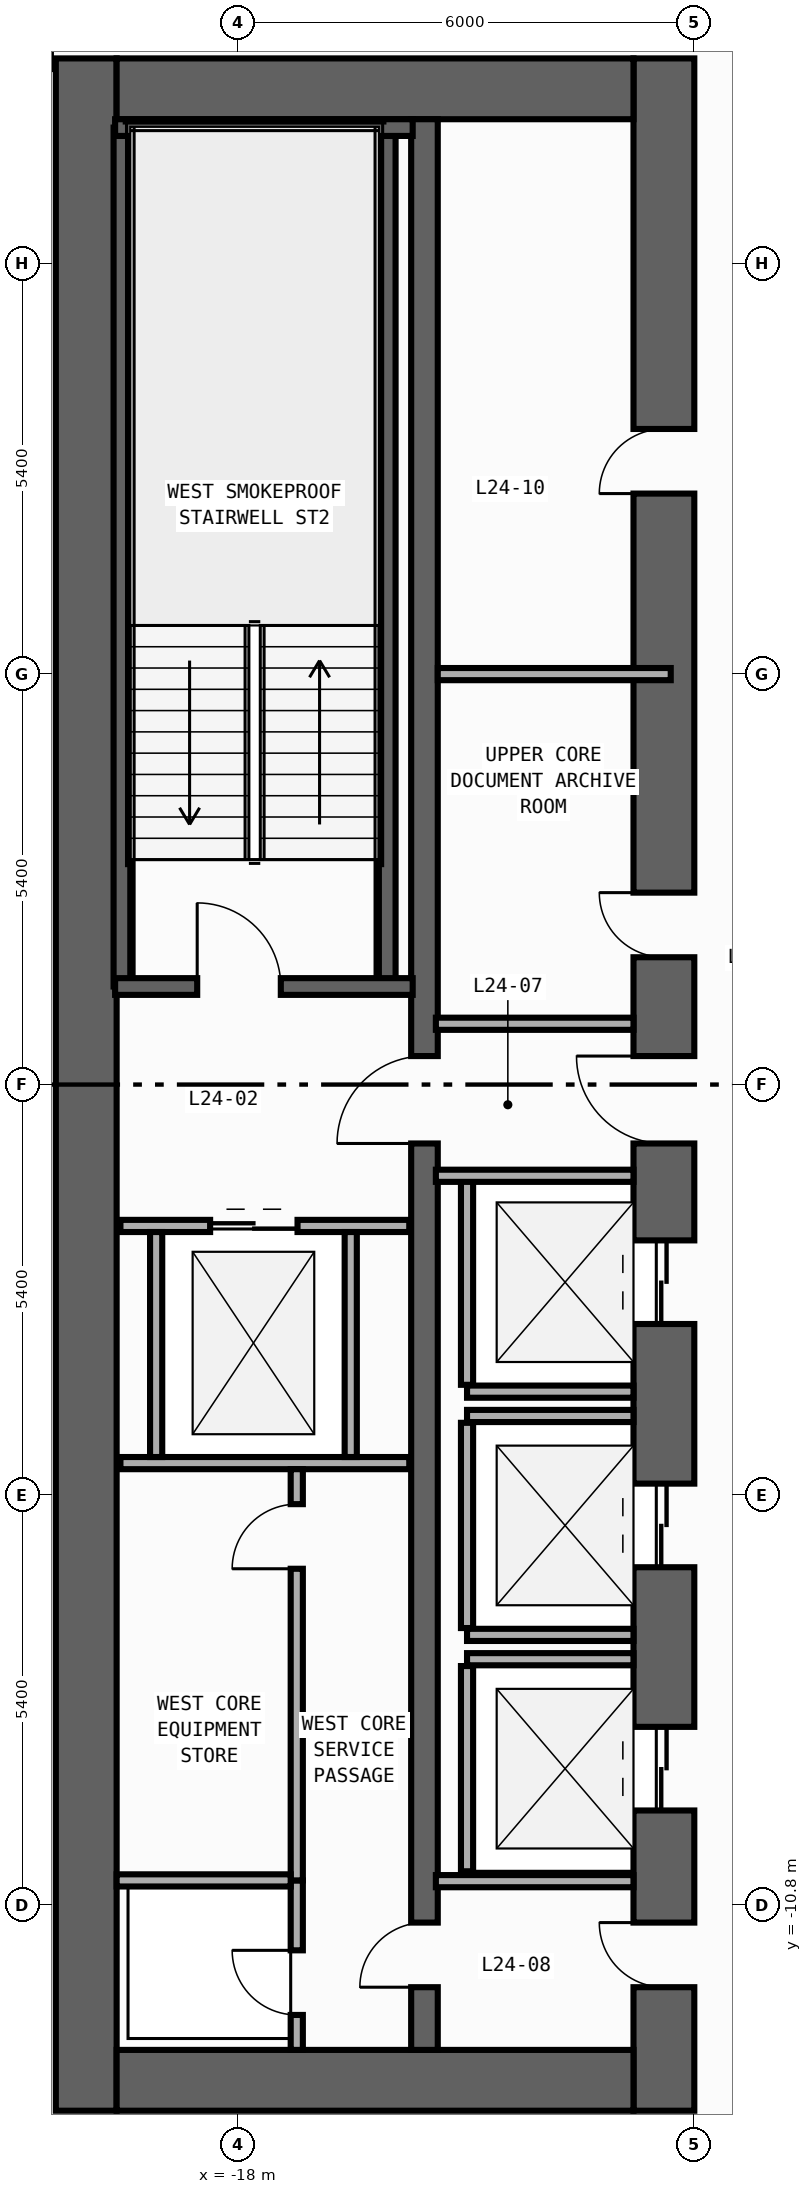
"""IFC4 building model, lengths in metres.
Left out: names, types, materials, properties, quantities, classifications, styles, units other than length and angle.
Written with IfcOpenShell. Run it as: python <this file> out.ifc"""

import sys

from ifc_helpers import new_model, si_unit, direction, frame, frame_2d, origin, place, context, subcontext, project, spatial, rectangle, extrude, element, fill, save


model = new_model("IFC4")
c1 = context("Model", 3, precision=1e-05, world=origin(), true_north=direction((0.0, 1.0)))
c2 = subcontext(c1, "Body", "Model", "MODEL_VIEW")
j1 = project(units=[si_unit("LENGTHUNIT", "METRE"), si_unit("PLANEANGLEUNIT", "RADIAN")], contexts=[c1])
p1 = place(None, origin())
s1 = spatial("IfcSite", under=j1, at=p1, CompositionType="ELEMENT")
p2 = place(p1, origin())
s2 = spatial("IfcBuilding", under=s1, at=p2, CompositionType="ELEMENT")
p3 = place(p2, frame((0.0, 0.0, 105.8)))
s3 = spatial("IfcBuildingStorey", under=s2, at=p3, CompositionType="ELEMENT", Elevation=105.8)
p4 = place(p3, frame((-20.0, -13.5, 0.0), z_axis=(0.0, 0.0, 1.0), x_axis=(0.0, 1.0, 0.0)))
e1 = element("IfcWall", 1, at=p4, inside=s3, PredefinedType="SHEAR", context=c2, shape_type="SweptSolid", body=[
    extrude(rectangle(XDim=27.0, YDim=0.8, at=frame_2d((13.5, 0.0))), origin(), (0.0, 0.0, 1.0), 3.94),
])
p5 = place(p3, frame((-12.4, -13.5, 0.0), z_axis=(0.0, 0.0, 1.0), x_axis=(0.0, 1.0, 0.0)))
e2 = element("IfcWall", 2, at=p5, inside=s3, PredefinedType="SHEAR", context=c2, shape_type="SweptSolid", body=[
    extrude(rectangle(XDim=27.0, YDim=0.8, at=frame_2d((13.5, 0.0))), origin(), (0.0, 0.0, 1.0), 3.94),
])
p6 = place(p5, frame((10.35, 0.0, 0.0)))
e3 = element("IfcOpeningElement", 3, at=p6, cuts=e2, PredefinedType="OPENING", context=c2, shape_type="SweptSolid", body=[
    extrude(rectangle(XDim=1.1, YDim=2.2, at=frame_2d((0.55, 1.1))), frame((0.0, 0.41, 0.0), z_axis=(0.0, -1.0, 0.0), x_axis=(1.0, 0.0, 0.0)), (0.0, 0.0, 1.0), 0.82),
])
p7 = place(p5, frame((7.15, 0.0, 0.0)))
e4 = element("IfcOpeningElement", 4, at=p7, cuts=e2, PredefinedType="OPENING", context=c2, shape_type="SweptSolid", body=[
    extrude(rectangle(XDim=1.1, YDim=2.2, at=frame_2d((0.55, 1.1))), frame((0.0, 0.41, 0.0), z_axis=(0.0, -1.0, 0.0), x_axis=(1.0, 0.0, 0.0)), (0.0, 0.0, 1.0), 0.82),
])
p8 = place(p5, frame((3.95, 0.0, 0.0)))
e5 = element("IfcOpeningElement", 5, at=p8, cuts=e2, PredefinedType="OPENING", context=c2, shape_type="SweptSolid", body=[
    extrude(rectangle(XDim=1.1, YDim=2.2, at=frame_2d((0.55, 1.1))), frame((0.0, 0.41, 0.0), z_axis=(0.0, -1.0, 0.0), x_axis=(1.0, 0.0, 0.0)), (0.0, 0.0, 1.0), 0.82),
])
p9 = place(p5, frame((15.175, 0.0, 0.0)))
e6 = element("IfcOpeningElement", 6, at=p9, cuts=e2, PredefinedType="OPENING", context=c2, shape_type="SweptSolid", body=[
    extrude(rectangle(XDim=0.85, YDim=2.1, at=frame_2d((0.425, 1.05))), frame((0.0, 0.41, 0.0), z_axis=(0.0, -1.0, 0.0), x_axis=(1.0, 0.0, 0.0)), (0.0, 0.0, 1.0), 0.82),
])
p10 = place(p5, frame((21.275, 0.0, 0.0)))
e7 = element("IfcOpeningElement", 7, at=p10, cuts=e2, PredefinedType="OPENING", context=c2, shape_type="SweptSolid", body=[
    extrude(rectangle(XDim=0.85, YDim=2.1, at=frame_2d((0.425, 1.05))), frame((0.0, 0.41, 0.0), z_axis=(0.0, -1.0, 0.0), x_axis=(1.0, 0.0, 0.0)), (0.0, 0.0, 1.0), 0.82),
])
p11 = place(p5, frame((12.725, 0.0, 0.0)))
e8 = element("IfcOpeningElement", 8, at=p11, cuts=e2, PredefinedType="OPENING", context=c2, shape_type="SweptSolid", body=[
    extrude(rectangle(XDim=1.15, YDim=2.2, at=frame_2d((0.575, 1.1))), frame((0.0, 0.41, 0.0), z_axis=(0.0, -1.0, 0.0), x_axis=(1.0, 0.0, 0.0)), (0.0, 0.0, 1.0), 0.82),
])
p12 = place(p5, frame((1.625, 0.0, 0.0)))
e9 = element("IfcOpeningElement", 9, at=p12, cuts=e2, PredefinedType="OPENING", context=c2, shape_type="SweptSolid", body=[
    extrude(rectangle(XDim=0.85, YDim=2.1, at=frame_2d((0.425, 1.05))), frame((0.0, 0.41, 0.0), z_axis=(0.0, -1.0, 0.0), x_axis=(1.0, 0.0, 0.0)), (0.0, 0.0, 1.0), 0.82),
])
for number, where, z_axis, x_axis in (
    (10, (-19.6, -13.1, 0.0), (0.0, 0.0, 1.0), (1.0, 0.0, 0.0)),
    (11, (-19.6, 13.1, 0.0), (0.0, 0.0, 1.0), (1.0, 0.0, 0.0)),
):
    element("IfcWall", number, at=place(p3, frame(where, z_axis=z_axis, x_axis=x_axis)), inside=s3, PredefinedType="SHEAR", context=c2, shape_type="SweptSolid", body=[
        extrude(rectangle(XDim=6.8, YDim=0.8, at=frame_2d((3.4, 0.0))), origin(), (0.0, 0.0, 1.0), 3.94),
    ])
p13 = place(p3, frame((-15.55, -12.7, 0.0), z_axis=(0.0, 0.0, 1.0), x_axis=(0.0, 1.0, 0.0)))
e12 = element("IfcWall", 12, at=p13, inside=s3, PredefinedType="SHEAR", context=c2, shape_type="SweptSolid", body=[
    extrude(rectangle(XDim=25.4, YDim=0.35, at=frame_2d((12.7, 0.0))), origin(), (0.0, 0.0, 1.0), 3.94),
])
p14 = place(p13, frame((11.925, 0.0, 0.0)))
e13 = element("IfcOpeningElement", 13, at=p14, cuts=e12, PredefinedType="OPENING", context=c2, shape_type="SweptSolid", body=[
    extrude(rectangle(XDim=1.15, YDim=2.2, at=frame_2d((0.575, 1.1))), frame((0.0, 0.185, 0.0), z_axis=(0.0, -1.0, 0.0), x_axis=(1.0, 0.0, 0.0)), (0.0, 0.0, 1.0), 0.37),
])
p15 = place(p13, frame((0.825, 0.0, 0.0)))
e14 = element("IfcOpeningElement", 14, at=p15, cuts=e12, PredefinedType="OPENING", context=c2, shape_type="SweptSolid", body=[
    extrude(rectangle(XDim=0.85, YDim=2.1, at=frame_2d((0.425, 1.05))), frame((0.0, 0.185, 0.0), z_axis=(0.0, -1.0, 0.0), x_axis=(1.0, 0.0, 0.0)), (0.0, 0.0, 1.0), 0.37),
])
for number, where, z_axis, x_axis in (
    (15, (-16.04, 1.29, 0.0), (0.0, 0.0, 1.0), (0.0, 1.0, 0.0)),
    (16, (-19.53, 1.29, 0.0), (0.0, 0.0, 1.0), (0.0, 1.0, 0.0)),
):
    element("IfcWall", number, at=place(p3, frame(where, z_axis=z_axis, x_axis=x_axis)), inside=s3, PredefinedType="SHEAR", context=c2, shape_type="SweptSolid", body=[
        extrude(rectangle(XDim=11.3, YDim=0.22, at=frame_2d((5.65, 0.0))), origin(), (0.0, 0.0, 1.0), 3.94),
    ])
p16 = place(p3, frame((-19.62, 12.59, 0.0), z_axis=(0.0, 0.0, 1.0), x_axis=(1.0, 0.0, 0.0)))
e17 = element("IfcWall", 17, at=p16, inside=s3, PredefinedType="SHEAR", context=c2, shape_type="SweptSolid", body=[
    extrude(rectangle(XDim=3.915, YDim=0.22, at=frame_2d((1.958, 0.0))), origin(), (0.0, 0.0, 1.0), 3.94),
])
p17 = place(p3, frame((-19.62, 1.29, 0.0), z_axis=(0.0, 0.0, 1.0), x_axis=(1.0, 0.0, 0.0)))
e18 = element("IfcWall", 18, at=p17, inside=s3, PredefinedType="SHEAR", context=c2, shape_type="SweptSolid", body=[
    extrude(rectangle(XDim=3.915, YDim=0.22, at=frame_2d((1.958, 0.0))), origin(), (0.0, 0.0, 1.0), 3.94),
])
p18 = place(p17, frame((1.08, 0.0, 0.0)))
e19 = element("IfcOpeningElement", 19, at=p18, cuts=e18, PredefinedType="OPENING", context=c2, shape_type="SweptSolid", body=[
    extrude(rectangle(XDim=1.1, YDim=2.2, at=frame_2d((0.55, 1.1))), frame((0.0, 0.12, 0.0), z_axis=(0.0, -1.0, 0.0), x_axis=(1.0, 0.0, 0.0)), (0.0, 0.0, 1.0), 0.24),
])
p19 = place(p3, frame((-14.99, -4.04, 0.0), z_axis=(0.0, 0.0, 1.0), x_axis=(1.0, 0.0, 0.0)))
e20 = element("IfcWall", 20, at=p19, inside=s3, PredefinedType="STANDARD", context=c2, shape_type="SweptSolid", body=[
    extrude(rectangle(XDim=2.19, YDim=0.16, at=frame_2d((1.095, 0.0))), origin(), (0.0, 0.0, 1.0), 3.94),
])
p20 = place(p3, frame((-14.99, -3.95, 0.0), z_axis=(0.0, 0.0, 1.0), x_axis=(0.0, 1.0, 0.0)))
e21 = element("IfcWall", 21, at=p20, inside=s3, PredefinedType="STANDARD", context=c2, shape_type="SweptSolid", body=[
    extrude(rectangle(XDim=2.7, YDim=0.16, at=frame_2d((1.35, 0.0))), origin(), (0.0, 0.0, 1.0), 3.94),
])
for number, where, z_axis, x_axis in (
    (22, (-14.99, -7.24, 0.0), (0.0, 0.0, 1.0), (1.0, 0.0, 0.0)),
    (23, (-14.99, -4.36, 0.0), (0.0, 0.0, 1.0), (1.0, 0.0, 0.0)),
):
    element("IfcWall", number, at=place(p3, frame(where, z_axis=z_axis, x_axis=x_axis)), inside=s3, PredefinedType="STANDARD", context=c2, shape_type="SweptSolid", body=[
        extrude(rectangle(XDim=2.19, YDim=0.16, at=frame_2d((1.095, 0.0))), origin(), (0.0, 0.0, 1.0), 3.94),
    ])
p21 = place(p3, frame((-14.99, -7.15, 0.0), z_axis=(0.0, 0.0, 1.0), x_axis=(0.0, 1.0, 0.0)))
e24 = element("IfcWall", 24, at=p21, inside=s3, PredefinedType="STANDARD", context=c2, shape_type="SweptSolid", body=[
    extrude(rectangle(XDim=2.7, YDim=0.16, at=frame_2d((1.35, 0.0))), origin(), (0.0, 0.0, 1.0), 3.94),
])
p22 = place(p3, frame((-14.99, -7.56, 0.0), z_axis=(0.0, 0.0, 1.0), x_axis=(1.0, 0.0, 0.0)))
e25 = element("IfcWall", 25, at=p22, inside=s3, PredefinedType="STANDARD", context=c2, shape_type="SweptSolid", body=[
    extrude(rectangle(XDim=2.19, YDim=0.16, at=frame_2d((1.095, 0.0))), origin(), (0.0, 0.0, 1.0), 3.94),
])
p23 = place(p3, frame((-14.99, -10.35, 0.0), z_axis=(0.0, 0.0, 1.0), x_axis=(0.0, 1.0, 0.0)))
e26 = element("IfcWall", 26, at=p23, inside=s3, PredefinedType="STANDARD", context=c2, shape_type="SweptSolid", body=[
    extrude(rectangle(XDim=2.7, YDim=0.16, at=frame_2d((1.35, 0.0))), origin(), (0.0, 0.0, 1.0), 3.94),
])
p24 = place(p3, frame((-19.55, -1.86, 0.0), z_axis=(0.0, 0.0, 1.0), x_axis=(1.0, 0.0, 0.0)))
e27 = element("IfcWall", 27, at=p24, inside=s3, PredefinedType="STANDARD", context=c2, shape_type="SweptSolid", body=[
    extrude(rectangle(XDim=3.8, YDim=0.16, at=frame_2d((1.9, 0.0))), origin(), (0.0, 0.0, 1.0), 3.94),
])
p25 = place(p24, frame((1.18, 0.0, 0.0)))
e28 = element("IfcOpeningElement", 28, at=p25, cuts=e27, PredefinedType="OPENING", context=c2, shape_type="SweptSolid", body=[
    extrude(rectangle(XDim=1.15, YDim=2.2, at=frame_2d((0.575, 1.1))), frame((0.0, 0.09, 0.0), z_axis=(0.0, -1.0, 0.0), x_axis=(1.0, 0.0, 0.0)), (0.0, 0.0, 1.0), 0.18),
])
p26 = place(p3, frame((-19.55, -4.98, 0.0), z_axis=(0.0, 0.0, 1.0), x_axis=(1.0, 0.0, 0.0)))
e29 = element("IfcWall", 29, at=p26, inside=s3, PredefinedType="STANDARD", context=c2, shape_type="SweptSolid", body=[
    extrude(rectangle(XDim=3.8, YDim=0.16, at=frame_2d((1.9, 0.0))), origin(), (0.0, 0.0, 1.0), 3.94),
])
for number, where, z_axis, x_axis in (
    (30, (-19.08, -4.9, 0.0), (0.0, 0.0, 1.0), (0.0, 1.0, 0.0)),
    (31, (-16.52, -4.9, 0.0), (0.0, 0.0, 1.0), (0.0, 1.0, 0.0)),
):
    element("IfcWall", number, at=place(p3, frame(where, z_axis=z_axis, x_axis=x_axis)), inside=s3, PredefinedType="STANDARD", context=c2, shape_type="SweptSolid", body=[
        extrude(rectangle(XDim=2.96, YDim=0.16, at=frame_2d((1.48, 0.0))), origin(), (0.0, 0.0, 1.0), 3.94),
    ])
for number, where, z_axis, x_axis in (
    (32, (-15.4, 0.8, 0.0), (0.0, 0.0, 1.0), (1.0, 0.0, 0.0)),
    (33, (-15.4, -1.2, 0.0), (0.0, 0.0, 1.0), (1.0, 0.0, 0.0)),
    (34, (-15.4, -10.48, 0.0), (0.0, 0.0, 1.0), (1.0, 0.0, 0.0)),
):
    element("IfcWall", number, at=place(p3, frame(where, z_axis=z_axis, x_axis=x_axis)), inside=s3, PredefinedType="STANDARD", context=c2, shape_type="SweptSolid", body=[
        extrude(rectangle(XDim=2.6, YDim=0.16, at=frame_2d((1.3, 0.0))), origin(), (0.0, 0.0, 1.0), 3.94),
    ])
p27 = place(p3, frame((-17.23, -12.7, 0.0), z_axis=(0.0, 0.0, 1.0), x_axis=(0.0, 1.0, 0.0)))
e35 = element("IfcWall", 35, at=p27, inside=s3, PredefinedType="PARTITIONING", context=c2, shape_type="SweptSolid", body=[
    extrude(rectangle(XDim=2.23, YDim=0.16, at=frame_2d((1.115, 0.0))), origin(), (0.0, 0.0, 1.0), 3.94),
])
p28 = place(p27, frame((0.46, 0.0, 0.0)))
e36 = element("IfcOpeningElement", 36, at=p28, cuts=e35, PredefinedType="OPENING", context=c2, shape_type="SweptSolid", body=[
    extrude(rectangle(XDim=0.85, YDim=2.1, at=frame_2d((0.425, 1.05))), frame((0.0, 0.09, 0.0), z_axis=(0.0, -1.0, 0.0), x_axis=(1.0, 0.0, 0.0)), (0.0, 0.0, 1.0), 0.18),
])
p29 = place(p3, frame((-17.23, -10.47, 0.0), z_axis=(0.0, 0.0, 1.0), x_axis=(0.0, 1.0, 0.0)))
e37 = element("IfcWall", 37, at=p29, inside=s3, PredefinedType="PARTITIONING", context=c2, shape_type="SweptSolid", body=[
    extrude(rectangle(XDim=5.41, YDim=0.16, at=frame_2d((2.705, 0.0))), origin(), (0.0, 0.0, 1.0), 3.94),
])
p30 = place(p29, frame((4.1, 0.0, 0.0)))
e38 = element("IfcOpeningElement", 38, at=p30, cuts=e37, PredefinedType="OPENING", context=c2, shape_type="SweptSolid", body=[
    extrude(rectangle(XDim=0.85, YDim=2.1, at=frame_2d((0.425, 1.05))), frame((0.0, 0.09, 0.0), z_axis=(0.0, -1.0, 0.0), x_axis=(1.0, 0.0, 0.0)), (0.0, 0.0, 1.0), 0.18),
])
p31 = place(p3, frame((-19.6, -10.47, 0.0), z_axis=(0.0, 0.0, 1.0), x_axis=(1.0, 0.0, 0.0)))
e39 = element("IfcWall", 39, at=p31, inside=s3, PredefinedType="PARTITIONING", context=c2, shape_type="SweptSolid", body=[
    extrude(rectangle(XDim=2.29, YDim=0.16, at=frame_2d((1.145, 0.0))), origin(), (0.0, 0.0, 1.0), 3.94),
])
p32 = place(p3, frame((-15.375, 5.4, 0.0), z_axis=(0.0, 0.0, 1.0), x_axis=(1.0, 0.0, 0.0)))
e40 = element("IfcWall", 40, at=p32, inside=s3, PredefinedType="PARTITIONING", context=c2, shape_type="SweptSolid", body=[
    extrude(rectangle(XDim=3.065, YDim=0.16, at=frame_2d((1.532, 0.0))), origin(), (0.0, 0.0, 1.0), 3.94),
])
p33 = place(p18, origin())
e41 = element("IfcDoor", 41, at=p33, inside=s3, OperationType="SINGLE_SWING_LEFT", PredefinedType="DOOR", context=c2, shape_type="SweptSolid", body=[
    extrude(rectangle(XDim=1.1, YDim=2.2, at=frame_2d((0.55, 1.1))), frame((0.0, 0.025, 0.0), z_axis=(0.0, -1.0, 0.0), x_axis=(1.0, 0.0, 0.0)), (0.0, 0.0, 1.0), 0.05),
])
fill(e19, e41)
p34 = place(p6, origin())
e42 = element("IfcDoor", 42, at=p34, inside=s3, OperationType="DOUBLE_DOOR_SLIDING", PredefinedType="DOOR", context=c2, shape_type="SweptSolid", body=[
    extrude(rectangle(XDim=1.1, YDim=2.2, at=frame_2d((0.55, 1.1))), frame((0.0, 0.025, 0.0), z_axis=(0.0, -1.0, 0.0), x_axis=(1.0, 0.0, 0.0)), (0.0, 0.0, 1.0), 0.05),
])
fill(e3, e42)
p35 = place(p7, origin())
e43 = element("IfcDoor", 43, at=p35, inside=s3, OperationType="DOUBLE_DOOR_SLIDING", PredefinedType="DOOR", context=c2, shape_type="SweptSolid", body=[
    extrude(rectangle(XDim=1.1, YDim=2.2, at=frame_2d((0.55, 1.1))), frame((0.0, 0.025, 0.0), z_axis=(0.0, -1.0, 0.0), x_axis=(1.0, 0.0, 0.0)), (0.0, 0.0, 1.0), 0.05),
])
fill(e4, e43)
p36 = place(p8, origin())
e44 = element("IfcDoor", 44, at=p36, inside=s3, OperationType="DOUBLE_DOOR_SLIDING", PredefinedType="DOOR", context=c2, shape_type="SweptSolid", body=[
    extrude(rectangle(XDim=1.1, YDim=2.2, at=frame_2d((0.55, 1.1))), frame((0.0, 0.025, 0.0), z_axis=(0.0, -1.0, 0.0), x_axis=(1.0, 0.0, 0.0)), (0.0, 0.0, 1.0), 0.05),
])
fill(e5, e44)
p37 = place(p9, origin())
e45 = element("IfcDoor", 45, at=p37, inside=s3, OperationType="SINGLE_SWING_RIGHT", PredefinedType="DOOR", context=c2, shape_type="SweptSolid", body=[
    extrude(rectangle(XDim=0.85, YDim=2.1, at=frame_2d((0.425, 1.05))), frame((0.0, 0.025, 0.0), z_axis=(0.0, -1.0, 0.0), x_axis=(1.0, 0.0, 0.0)), (0.0, 0.0, 1.0), 0.05),
])
fill(e6, e45)
p38 = place(p10, origin())
e46 = element("IfcDoor", 46, at=p38, inside=s3, OperationType="SINGLE_SWING_LEFT", PredefinedType="DOOR", context=c2, shape_type="SweptSolid", body=[
    extrude(rectangle(XDim=0.85, YDim=2.1, at=frame_2d((0.425, 1.05))), frame((0.0, 0.025, 0.0), z_axis=(0.0, -1.0, 0.0), x_axis=(1.0, 0.0, 0.0)), (0.0, 0.0, 1.0), 0.05),
])
fill(e7, e46)
p39 = place(p11, origin())
e47 = element("IfcDoor", 47, at=p39, inside=s3, OperationType="SINGLE_SWING_RIGHT", PredefinedType="DOOR", context=c2, shape_type="SweptSolid", body=[
    extrude(rectangle(XDim=1.15, YDim=2.2, at=frame_2d((0.575, 1.1))), frame((0.0, 0.025, 0.0), z_axis=(0.0, -1.0, 0.0), x_axis=(1.0, 0.0, 0.0)), (0.0, 0.0, 1.0), 0.05),
])
fill(e8, e47)
p40 = place(p14, origin())
e48 = element("IfcDoor", 48, at=p40, inside=s3, OperationType="SINGLE_SWING_LEFT", PredefinedType="DOOR", context=c2, shape_type="SweptSolid", body=[
    extrude(rectangle(XDim=1.15, YDim=2.2, at=frame_2d((0.575, 1.1))), frame((0.0, 0.025, 0.0), z_axis=(0.0, -1.0, 0.0), x_axis=(1.0, 0.0, 0.0)), (0.0, 0.0, 1.0), 0.05),
])
fill(e13, e48)
p41 = place(p12, origin())
e49 = element("IfcDoor", 49, at=p41, inside=s3, OperationType="SINGLE_SWING_RIGHT", PredefinedType="DOOR", context=c2, shape_type="SweptSolid", body=[
    extrude(rectangle(XDim=0.85, YDim=2.1, at=frame_2d((0.425, 1.05))), frame((0.0, 0.025, 0.0), z_axis=(0.0, -1.0, 0.0), x_axis=(1.0, 0.0, 0.0)), (0.0, 0.0, 1.0), 0.05),
])
fill(e9, e49)
p42 = place(p15, origin())
e50 = element("IfcDoor", 50, at=p42, inside=s3, OperationType="SINGLE_SWING_LEFT", PredefinedType="DOOR", context=c2, shape_type="SweptSolid", body=[
    extrude(rectangle(XDim=0.85, YDim=2.1, at=frame_2d((0.425, 1.05))), frame((0.0, 0.025, 0.0), z_axis=(0.0, -1.0, 0.0), x_axis=(1.0, 0.0, 0.0)), (0.0, 0.0, 1.0), 0.05),
])
fill(e14, e50)
p43 = place(p25, origin())
e51 = element("IfcDoor", 51, at=p43, inside=s3, OperationType="DOUBLE_DOOR_SLIDING", PredefinedType="DOOR", context=c2, shape_type="SweptSolid", body=[
    extrude(rectangle(XDim=1.15, YDim=2.2, at=frame_2d((0.575, 1.1))), frame((0.0, 0.025, 0.0), z_axis=(0.0, -1.0, 0.0), x_axis=(1.0, 0.0, 0.0)), (0.0, 0.0, 1.0), 0.05),
])
fill(e28, e51)
p44 = place(p28, origin())
e52 = element("IfcDoor", 52, at=p44, inside=s3, OperationType="SINGLE_SWING_RIGHT", PredefinedType="DOOR", context=c2, shape_type="SweptSolid", body=[
    extrude(rectangle(XDim=0.85, YDim=2.1, at=frame_2d((0.425, 1.05))), frame((0.0, 0.025, 0.0), z_axis=(0.0, -1.0, 0.0), x_axis=(1.0, 0.0, 0.0)), (0.0, 0.0, 1.0), 0.05),
])
fill(e36, e52)
p45 = place(p30, origin())
e53 = element("IfcDoor", 53, at=p45, inside=s3, OperationType="SINGLE_SWING_LEFT", PredefinedType="DOOR", context=c2, shape_type="SweptSolid", body=[
    extrude(rectangle(XDim=0.85, YDim=2.1, at=frame_2d((0.425, 1.05))), frame((0.0, 0.025, 0.0), z_axis=(0.0, -1.0, 0.0), x_axis=(1.0, 0.0, 0.0)), (0.0, 0.0, 1.0), 0.05),
])
fill(e38, e53)
save(model, sys.argv[1])
